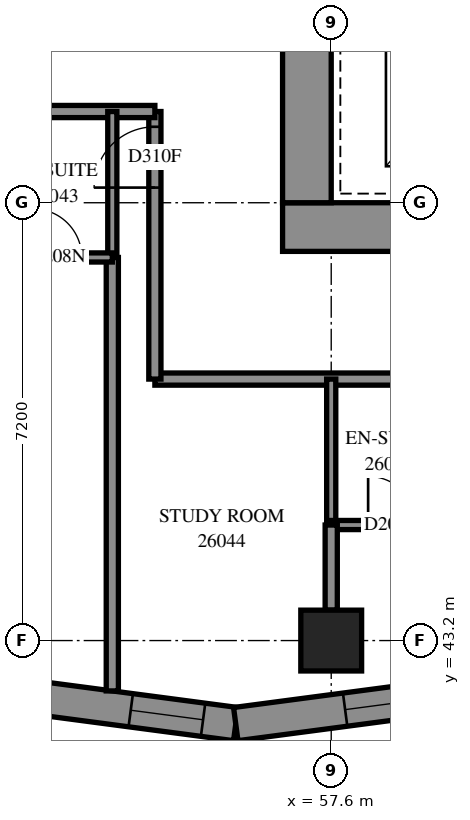
"""IFC4 building model, lengths in metres.
Left out: names, types, materials, properties, quantities, classifications, styles, units other than length and angle.
Written with IfcOpenShell. Run it as: python <this file> out.ifc"""

import sys

from ifc_helpers import new_model, si_unit, direction, frame, frame_2d, origin, origin_2d, place, context, subcontext, project, spatial, polyline, rectangle, outline, extrude, element, fill, save


model = new_model("IFC4")
c1 = context("Model", 3, precision=1e-05, world=origin(), true_north=direction((0.0, 1.0)))
c2 = subcontext(c1, "Body", "Model", "MODEL_VIEW")
j1 = project(units=[si_unit("LENGTHUNIT", "METRE"), si_unit("PLANEANGLEUNIT", "RADIAN")], contexts=[c1])
p1 = place(None, origin())
s1 = spatial("IfcSite", under=j1, at=p1, CompositionType="ELEMENT")
p2 = place(p1, origin())
s2 = spatial("IfcBuilding", under=s1, at=p2, CompositionType="ELEMENT")
p3 = place(p2, frame((0.0, 0.0, 98.2)))
s3 = spatial("IfcBuildingStorey", under=s2, at=p3, CompositionType="ELEMENT", Elevation=98.2)
p4 = place(p3, frame((57.6, 43.2, 0.0), z_axis=(0.0, 0.0, 1.0), x_axis=(1.0, 0.0, 0.0)))
e1 = element("IfcColumn", 1, at=p4, inside=s3, PredefinedType="COLUMN", context=c2, shape_type="SweptSolid", body=[
    extrude(rectangle(XDim=1.0, YDim=1.0, at=origin_2d()), origin(), (0.0, 0.0, 1.0), 3.1),
])
p5 = place(p3, frame((56.8, 50.0, -0.3), z_axis=(0.0, 0.0, 1.0), x_axis=(1.0, 0.0, 0.0)))
e2 = element("IfcWall", 2, at=p5, inside=s3, PredefinedType="SHEAR", context=c2, shape_type="SweptSolid", body=[
    extrude(rectangle(XDim=16.0, YDim=0.8, at=frame_2d((8.0, 0.0))), origin(), (0.0, 0.0, 1.0), 2.7),
])
p6 = place(p3, frame((57.2, 50.4, -0.3), z_axis=(0.0, 0.0, 1.0), x_axis=(0.0, 1.0, 0.0)))
e3 = element("IfcWall", 3, at=p6, inside=s3, PredefinedType="SHEAR", context=c2, shape_type="SweptSolid", body=[
    extrude(rectangle(XDim=14.4, YDim=0.8, at=frame_2d((7.2, 0.0))), origin(), (0.0, 0.0, 1.0), 2.7),
])
p7 = place(p6, frame((4.55, 0.0, 0.3)))
e4 = element("IfcOpeningElement", 4, at=p7, cuts=e3, PredefinedType="OPENING", context=c2, shape_type="SweptSolid", body=[
    extrude(rectangle(XDim=1.1, YDim=2.1, at=frame_2d((0.55, 1.05))), frame((0.0, 0.41, 0.0), z_axis=(0.0, -1.0, 0.0), x_axis=(1.0, 0.0, 0.0)), (0.0, 0.0, 1.0), 0.82),
])
p8 = place(p6, frame((11.35, 0.0, 0.3)))
e5 = element("IfcOpeningElement", 5, at=p8, cuts=e3, PredefinedType="OPENING", context=c2, shape_type="SweptSolid", body=[
    extrude(rectangle(XDim=1.1, YDim=2.1, at=frame_2d((0.55, 1.05))), frame((0.0, 0.41, 0.0), z_axis=(0.0, -1.0, 0.0), x_axis=(1.0, 0.0, 0.0)), (0.0, 0.0, 1.0), 0.82),
])
p9 = place(p3, frame((52.592, 42.281, 0.0), z_axis=(0.0, 0.0, 1.0), x_axis=(0.9913920636, -0.1309266064, 0.0)))
e6 = element("IfcWall", 6, at=p9, inside=s3, PredefinedType="SOLIDWALL", context=c2, shape_type="SweptSolid", body=[
    extrude(outline(polyline([(0.06, -0.275), (3.505, -0.275), (3.432, 0.275), (-0.06, 0.275), (0.06, -0.275)])), origin(), (0.0, 0.0, 1.0), 3.1),
])
p10 = place(p9, frame((1.726, 0.0, 0.5)))
e7 = element("IfcOpeningElement", 7, at=p10, cuts=e6, PredefinedType="OPENING", context=c2, shape_type="SweptSolid", body=[
    extrude(rectangle(XDim=1.2, YDim=2.45, at=frame_2d((0.6, 1.225))), frame((0.0, 0.285, 0.0), z_axis=(0.0, -1.0, 0.0), x_axis=(1.0, 0.0, 0.0)), (0.0, 0.0, 1.0), 0.57),
])
p11 = place(p3, frame((56.03, 41.826, 0.0), z_axis=(0.0, 0.0, 1.0), x_axis=(0.9913924297, 0.1309238341, 0.0)))
e8 = element("IfcWall", 8, at=p11, inside=s3, PredefinedType="SOLIDWALL", context=c2, shape_type="SweptSolid", body=[
    extrude(outline(polyline([(-0.036, -0.275), (3.408, -0.275), (3.481, 0.275), (0.036, 0.275), (-0.036, -0.275)])), origin(), (0.0, 0.0, 1.0), 3.1),
])
p12 = place(p11, frame((1.814, 0.0, 0.5)))
e9 = element("IfcOpeningElement", 9, at=p12, cuts=e8, PredefinedType="OPENING", context=c2, shape_type="SweptSolid", body=[
    extrude(rectangle(XDim=1.2, YDim=2.45, at=frame_2d((0.6, 1.225))), frame((0.0, 0.285, 0.0), z_axis=(0.0, -1.0, 0.0), x_axis=(1.0, 0.0, 0.0)), (0.0, 0.0, 1.0), 0.57),
])
p13 = place(p3, frame((54.7, 47.5, 0.0), z_axis=(0.0, 0.0, 1.0), x_axis=(1.0, 0.0, 0.0)))
e10 = element("IfcWall", 10, at=p13, inside=s3, PredefinedType="PARTITIONING", context=c2, shape_type="SweptSolid", body=[
    extrude(rectangle(XDim=19.442, YDim=0.2, at=frame_2d((9.721, 0.0))), origin(), (0.0, 0.0, 1.0), 3.1),
])
p14 = place(p13, frame((5.2, 0.0, 0.0)))
e11 = element("IfcOpeningElement", 11, at=p14, cuts=e10, PredefinedType="OPENING", context=c2, shape_type="SweptSolid", body=[
    extrude(rectangle(XDim=0.9, YDim=2.1, at=frame_2d((0.45, 1.05))), frame((0.0, 0.11, 0.0), z_axis=(0.0, -1.0, 0.0), x_axis=(1.0, 0.0, 0.0)), (0.0, 0.0, 1.0), 0.22),
])
p15 = place(p13, frame((6.9, 0.0, 0.0)))
e12 = element("IfcOpeningElement", 12, at=p15, cuts=e10, PredefinedType="OPENING", context=c2, shape_type="SweptSolid", body=[
    extrude(rectangle(XDim=0.9, YDim=2.1, at=frame_2d((0.45, 1.05))), frame((0.0, 0.11, 0.0), z_axis=(0.0, -1.0, 0.0), x_axis=(1.0, 0.0, 0.0)), (0.0, 0.0, 1.0), 0.22),
])
p16 = place(p13, frame((13.963, 0.0, 0.0)))
e13 = element("IfcOpeningElement", 13, at=p16, cuts=e10, PredefinedType="OPENING", context=c2, shape_type="SweptSolid", body=[
    extrude(rectangle(XDim=1.0, YDim=2.1, at=frame_2d((0.5, 1.05))), frame((0.0, 0.11, 0.0), z_axis=(0.0, -1.0, 0.0), x_axis=(1.0, 0.0, 0.0)), (0.0, 0.0, 1.0), 0.22),
])
p17 = place(p3, frame((54.0, 42.372, 0.0), z_axis=(0.0, 0.0, 1.0), x_axis=(0.0, 1.0, 0.0)))
e14 = element("IfcWall", 14, at=p17, inside=s3, PredefinedType="PARTITIONING", context=c2, shape_type="SweptSolid", body=[
    extrude(rectangle(XDim=7.128, YDim=0.2, at=frame_2d((3.564, 0.0))), origin(), (0.0, 0.0, 1.0), 3.1),
])
p18 = place(p3, frame((54.7, 47.5, 0.0), z_axis=(0.0, 0.0, 1.0), x_axis=(0.0, 1.0, 0.0)))
e15 = element("IfcWall", 15, at=p18, inside=s3, PredefinedType="PARTITIONING", context=c2, shape_type="SweptSolid", body=[
    extrude(rectangle(XDim=4.4, YDim=0.2, at=frame_2d((2.2, 0.0))), origin(), (0.0, 0.0, 1.0), 3.1),
])
p19 = place(p18, frame((3.149, 0.0, 0.0)))
e16 = element("IfcOpeningElement", 16, at=p19, cuts=e15, PredefinedType="OPENING", context=c2, shape_type="SweptSolid", body=[
    extrude(rectangle(XDim=1.0, YDim=2.1, at=frame_2d((0.5, 1.05))), frame((0.0, 0.11, 0.0), z_axis=(0.0, -1.0, 0.0), x_axis=(1.0, 0.0, 0.0)), (0.0, 0.0, 1.0), 0.22),
])
p20 = place(p3, frame((50.4, 51.9, 0.0), z_axis=(0.0, 0.0, 1.0), x_axis=(1.0, 0.0, 0.0)))
e17 = element("IfcWall", 17, at=p20, inside=s3, PredefinedType="PARTITIONING", context=c2, shape_type="SweptSolid", body=[
    extrude(rectangle(XDim=4.3, YDim=0.2, at=frame_2d((2.15, 0.0))), origin(), (0.0, 0.0, 1.0), 3.1),
])
p21 = place(p20, frame((0.552, 0.0, 0.0)))
e18 = element("IfcOpeningElement", 18, at=p21, cuts=e17, PredefinedType="OPENING", context=c2, shape_type="SweptSolid", body=[
    extrude(rectangle(XDim=0.9, YDim=2.1, at=frame_2d((0.45, 1.05))), frame((0.0, 0.11, 0.0), z_axis=(0.0, -1.0, 0.0), x_axis=(1.0, 0.0, 0.0)), (0.0, 0.0, 1.0), 0.22),
])
for number, where, z_axis, x_axis in (
    (19, (54.0, 49.5, 0.0), (0.0, 0.0, 1.0), (0.0, 1.0, 0.0)),
    (20, (57.6, 45.1, 0.0), (0.0, 0.0, 1.0), (0.0, 1.0, 0.0)),
):
    element("IfcWall", number, at=place(p3, frame(where, z_axis=z_axis, x_axis=x_axis)), inside=s3, PredefinedType="PARTITIONING", context=c2, shape_type="SweptSolid", body=[
        extrude(rectangle(XDim=2.4, YDim=0.15, at=frame_2d((1.2, 0.0))), origin(), (0.0, 0.0, 1.0), 3.1),
    ])
p22 = place(p3, frame((52.1, 49.5, 0.0), z_axis=(0.0, 0.0, 1.0), x_axis=(1.0, 0.0, 0.0)))
e21 = element("IfcWall", 21, at=p22, inside=s3, PredefinedType="PARTITIONING", context=c2, shape_type="SweptSolid", body=[
    extrude(rectangle(XDim=1.9, YDim=0.15, at=frame_2d((0.95, 0.0))), origin(), (0.0, 0.0, 1.0), 3.1),
])
p23 = place(p22, frame((0.598, 0.0, 0.0)))
e22 = element("IfcOpeningElement", 22, at=p23, cuts=e21, PredefinedType="OPENING", context=c2, shape_type="SweptSolid", body=[
    extrude(rectangle(XDim=0.8, YDim=2.1, at=frame_2d((0.4, 1.05))), frame((0.0, 0.085, 0.0), z_axis=(0.0, -1.0, 0.0), x_axis=(1.0, 0.0, 0.0)), (0.0, 0.0, 1.0), 0.17),
])
p24 = place(p3, frame((57.6, 45.1, 0.0), z_axis=(0.0, 0.0, 1.0), x_axis=(1.0, 0.0, 0.0)))
e23 = element("IfcWall", 23, at=p24, inside=s3, PredefinedType="PARTITIONING", context=c2, shape_type="SweptSolid", body=[
    extrude(rectangle(XDim=1.9, YDim=0.15, at=frame_2d((0.95, 0.0))), origin(), (0.0, 0.0, 1.0), 3.1),
])
p25 = place(p24, frame((0.607, 0.0, 0.0)))
e24 = element("IfcOpeningElement", 24, at=p25, cuts=e23, PredefinedType="OPENING", context=c2, shape_type="SweptSolid", body=[
    extrude(rectangle(XDim=0.8, YDim=2.1, at=frame_2d((0.4, 1.05))), frame((0.0, 0.085, 0.0), z_axis=(0.0, -1.0, 0.0), x_axis=(1.0, 0.0, 0.0)), (0.0, 0.0, 1.0), 0.17),
])
p26 = place(p3, frame((57.6, 43.7, 0.0), z_axis=(0.0, 0.0, 1.0), x_axis=(0.0, 1.0, 0.0)))
e25 = element("IfcWall", 25, at=p26, inside=s3, PredefinedType="PARTITIONING", context=c2, shape_type="SweptSolid", body=[
    extrude(rectangle(XDim=1.4, YDim=0.2, at=frame_2d((0.7, 0.0))), origin(), (0.0, 0.0, 1.0), 3.1),
])
p27 = place(p10, origin())
e26 = element("IfcWindow", 26, at=p27, inside=s3, PartitioningType="SINGLE_PANEL", PredefinedType="WINDOW", context=c2, shape_type="SweptSolid", body=[
    extrude(rectangle(XDim=1.2, YDim=2.45, at=frame_2d((0.6, 1.225))), frame((0.0, 0.155, 0.0), z_axis=(0.0, -1.0, 0.0), x_axis=(1.0, 0.0, 0.0)), (0.0, 0.0, 1.0), 0.06),
])
fill(e7, e26)
p28 = place(p12, origin())
e27 = element("IfcWindow", 27, at=p28, inside=s3, PartitioningType="SINGLE_PANEL", PredefinedType="WINDOW", context=c2, shape_type="SweptSolid", body=[
    extrude(rectangle(XDim=1.2, YDim=2.45, at=frame_2d((0.6, 1.225))), frame((0.0, 0.155, 0.0), z_axis=(0.0, -1.0, 0.0), x_axis=(1.0, 0.0, 0.0)), (0.0, 0.0, 1.0), 0.06),
])
fill(e9, e27)
p29 = place(p23, origin())
e28 = element("IfcDoor", 28, at=p29, inside=s3, OperationType="SINGLE_SWING_RIGHT", PredefinedType="DOOR", context=c2, shape_type="SweptSolid", body=[
    extrude(rectangle(XDim=0.8, YDim=2.1, at=frame_2d((0.4, 1.05))), frame((0.0, 0.025, 0.0), z_axis=(0.0, -1.0, 0.0), x_axis=(1.0, 0.0, 0.0)), (0.0, 0.0, 1.0), 0.05),
])
fill(e22, e28)
p30 = place(p19, origin())
e29 = element("IfcDoor", 29, at=p30, inside=s3, OperationType="SINGLE_SWING_RIGHT", PredefinedType="DOOR", context=c2, shape_type="SweptSolid", body=[
    extrude(rectangle(XDim=1.0, YDim=2.1, at=frame_2d((0.5, 1.05))), frame((0.0, 0.025, 0.0), z_axis=(0.0, -1.0, 0.0), x_axis=(1.0, 0.0, 0.0)), (0.0, 0.0, 1.0), 0.05),
])
fill(e16, e29)
p31 = place(p25, origin())
e30 = element("IfcDoor", 30, at=p31, inside=s3, OperationType="SINGLE_SWING_RIGHT", PredefinedType="DOOR", context=c2, shape_type="SweptSolid", body=[
    extrude(rectangle(XDim=0.8, YDim=2.1, at=frame_2d((0.4, 1.05))), frame((0.0, 0.025, 0.0), z_axis=(0.0, -1.0, 0.0), x_axis=(1.0, 0.0, 0.0)), (0.0, 0.0, 1.0), 0.05),
])
fill(e24, e30)
save(model, sys.argv[1])
